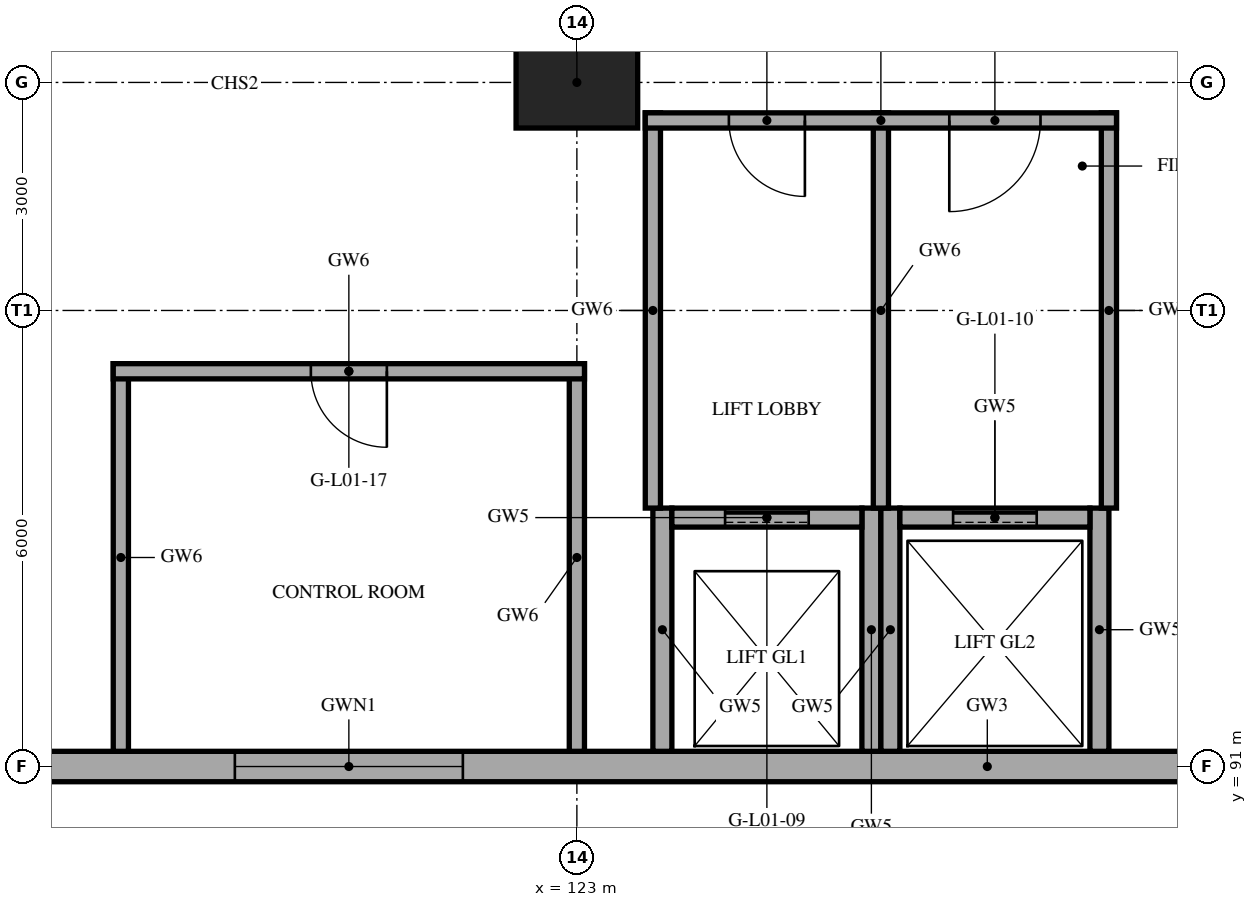
"""IFC4 building model, lengths in metres.
Left out: names, types, materials, properties, quantities, classifications, styles, units other than length and angle.
Written with IfcOpenShell. Run it as: python <this file> out.ifc"""

import sys

from ifc_helpers import new_model, si_unit, direction, frame, frame_2d, origin, origin_2d, place, context, subcontext, project, spatial, rectangle, extrude, element, fill, save


model = new_model("IFC4")
c1 = context("Model", 3, precision=1e-05, world=origin(), true_north=direction((0.0, 1.0)))
c2 = subcontext(c1, "Body", "Model", "MODEL_VIEW")
j1 = project(units=[si_unit("LENGTHUNIT", "METRE"), si_unit("PLANEANGLEUNIT", "RADIAN")], contexts=[c1])
p1 = place(None, origin())
s1 = spatial("IfcSite", under=j1, at=p1, CompositionType="ELEMENT")
p2 = place(p1, origin())
s2 = spatial("IfcBuilding", under=s1, at=p2, CompositionType="ELEMENT")
p3 = place(p2, frame((0.0, 0.0, 5.0)))
s3 = spatial("IfcBuildingStorey", under=s2, at=p3, CompositionType="ELEMENT", Elevation=5.0)
p4 = place(p3, frame((123.0, 100.0, 0.0), z_axis=(0.0, 0.0, 1.0), x_axis=(1.0, 0.0, 0.0)))
e1 = element("IfcColumn", 1, at=p4, inside=s3, PredefinedType="COLUMN", context=c2, shape_type="SweptSolid", body=[
    extrude(rectangle(XDim=1.6, YDim=1.2, at=origin_2d()), origin(), (0.0, 0.0, 1.0), 5.0),
])
p5 = place(p3, frame((107.6, 91.0, 0.0), z_axis=(0.0, 0.0, 1.0), x_axis=(1.0, 0.0, 0.0)))
e2 = element("IfcWall", 2, at=p5, inside=s3, PredefinedType="SHEAR", context=c2, shape_type="SweptSolid", body=[
    extrude(rectangle(XDim=41.6, YDim=0.4, at=frame_2d((20.8, 0.0))), origin(), (0.0, 0.0, 1.0), 5.0),
])
p6 = place(p5, frame((10.9, 0.0, 1.0)))
e3 = element("IfcOpeningElement", 3, at=p6, cuts=e2, PredefinedType="OPENING", context=c2, shape_type="SweptSolid", body=[
    extrude(rectangle(XDim=3.0, YDim=1.2, at=frame_2d((1.5, 0.6))), frame((0.0, 0.21, 0.0), z_axis=(0.0, -1.0, 0.0), x_axis=(1.0, 0.0, 0.0)), (0.0, 0.0, 1.0), 0.42),
])
p7 = place(p5, frame((2.5, 0.0, 0.0)))
e4 = element("IfcOpeningElement", 4, at=p7, cuts=e2, PredefinedType="OPENING", context=c2, shape_type="SweptSolid", body=[
    extrude(rectangle(XDim=1.8, YDim=2.1, at=frame_2d((0.9, 1.05))), frame((0.0, 0.21, 0.0), z_axis=(0.0, -1.0, 0.0), x_axis=(1.0, 0.0, 0.0)), (0.0, 0.0, 1.0), 0.42),
])
p8 = place(p5, frame((37.5, 0.0, 0.0)))
e5 = element("IfcOpeningElement", 5, at=p8, cuts=e2, PredefinedType="OPENING", context=c2, shape_type="SweptSolid", body=[
    extrude(rectangle(XDim=1.8, YDim=2.1, at=frame_2d((0.9, 1.05))), frame((0.0, 0.21, 0.0), z_axis=(0.0, -1.0, 0.0), x_axis=(1.0, 0.0, 0.0)), (0.0, 0.0, 1.0), 0.42),
])
for number, where, z_axis, x_axis in (
    (6, (124.125, 91.2, 0.0), (0.0, 0.0, 1.0), (0.0, 1.0, 0.0)),
    (7, (126.875, 91.2, 0.0), (0.0, 0.0, 1.0), (0.0, 1.0, 0.0)),
):
    element("IfcWall", number, at=place(p3, frame(where, z_axis=z_axis, x_axis=x_axis)), inside=s3, PredefinedType="SHEAR", context=c2, shape_type="SweptSolid", body=[
        extrude(rectangle(XDim=3.2, YDim=0.25, at=frame_2d((1.6, 0.0))), origin(), (0.0, 0.0, 1.0), 5.0),
    ])
p9 = place(p3, frame((124.25, 94.275, 0.0), z_axis=(0.0, 0.0, 1.0), x_axis=(1.0, 0.0, 0.0)))
e8 = element("IfcWall", 8, at=p9, inside=s3, PredefinedType="SHEAR", context=c2, shape_type="SweptSolid", body=[
    extrude(rectangle(XDim=2.5, YDim=0.25, at=frame_2d((1.25, 0.0))), origin(), (0.0, 0.0, 1.0), 5.0),
])
p10 = place(p9, frame((0.7, 0.0, 0.0)))
e9 = element("IfcOpeningElement", 9, at=p10, cuts=e8, PredefinedType="OPENING", context=c2, shape_type="SweptSolid", body=[
    extrude(rectangle(XDim=1.1, YDim=2.1, at=frame_2d((0.55, 1.05))), frame((0.0, 0.135, 0.0), z_axis=(0.0, -1.0, 0.0), x_axis=(1.0, 0.0, 0.0)), (0.0, 0.0, 1.0), 0.27),
])
for number, where, z_axis, x_axis in (
    (10, (127.125, 91.2, 0.0), (0.0, 0.0, 1.0), (0.0, 1.0, 0.0)),
    (11, (129.875, 91.2, 0.0), (0.0, 0.0, 1.0), (0.0, 1.0, 0.0)),
):
    element("IfcWall", number, at=place(p3, frame(where, z_axis=z_axis, x_axis=x_axis)), inside=s3, PredefinedType="SHEAR", context=c2, shape_type="SweptSolid", body=[
        extrude(rectangle(XDim=3.2, YDim=0.25, at=frame_2d((1.6, 0.0))), origin(), (0.0, 0.0, 1.0), 5.0),
    ])
p11 = place(p3, frame((127.25, 94.275, 0.0), z_axis=(0.0, 0.0, 1.0), x_axis=(1.0, 0.0, 0.0)))
e12 = element("IfcWall", 12, at=p11, inside=s3, PredefinedType="SHEAR", context=c2, shape_type="SweptSolid", body=[
    extrude(rectangle(XDim=2.5, YDim=0.25, at=frame_2d((1.25, 0.0))), origin(), (0.0, 0.0, 1.0), 5.0),
])
p12 = place(p11, frame((0.7, 0.0, 0.0)))
e13 = element("IfcOpeningElement", 13, at=p12, cuts=e12, PredefinedType="OPENING", context=c2, shape_type="SweptSolid", body=[
    extrude(rectangle(XDim=1.1, YDim=2.1, at=frame_2d((0.55, 1.05))), frame((0.0, 0.135, 0.0), z_axis=(0.0, -1.0, 0.0), x_axis=(1.0, 0.0, 0.0)), (0.0, 0.0, 1.0), 0.27),
])
for number, where, z_axis, x_axis in (
    (14, (124.0, 94.4, 0.0), (0.0, 0.0, 1.0), (0.0, 1.0, 0.0)),
    (15, (127.0, 94.4, 0.0), (0.0, 0.0, 1.0), (0.0, 1.0, 0.0)),
    (16, (130.0, 94.4, 0.0), (0.0, 0.0, 1.0), (0.0, 1.0, 0.0)),
):
    element("IfcWall", number, at=place(p3, frame(where, z_axis=z_axis, x_axis=x_axis)), inside=s3, PredefinedType="PARTITIONING", context=c2, shape_type="SweptSolid", body=[
        extrude(rectangle(XDim=5.2, YDim=0.2, at=frame_2d((2.6, 0.0))), origin(), (0.0, 0.0, 1.0), 4.7),
    ])
p13 = place(p3, frame((123.9, 99.5, 0.0), z_axis=(0.0, 0.0, 1.0), x_axis=(1.0, 0.0, 0.0)))
e17 = element("IfcWall", 17, at=p13, inside=s3, PredefinedType="PARTITIONING", context=c2, shape_type="SweptSolid", body=[
    extrude(rectangle(XDim=6.2, YDim=0.2, at=frame_2d((3.1, 0.0))), origin(), (0.0, 0.0, 1.0), 4.7),
])
p14 = place(p13, frame((1.1, 0.0, 0.0)))
e18 = element("IfcOpeningElement", 18, at=p14, cuts=e17, PredefinedType="OPENING", context=c2, shape_type="SweptSolid", body=[
    extrude(rectangle(XDim=1.0, YDim=2.1, at=frame_2d((0.5, 1.05))), frame((0.0, 0.11, 0.0), z_axis=(0.0, -1.0, 0.0), x_axis=(1.0, 0.0, 0.0)), (0.0, 0.0, 1.0), 0.22),
])
p15 = place(p13, frame((4.0, 0.0, 0.0)))
e19 = element("IfcOpeningElement", 19, at=p15, cuts=e17, PredefinedType="OPENING", context=c2, shape_type="SweptSolid", body=[
    extrude(rectangle(XDim=1.2, YDim=2.1, at=frame_2d((0.6, 1.05))), frame((0.0, 0.11, 0.0), z_axis=(0.0, -1.0, 0.0), x_axis=(1.0, 0.0, 0.0)), (0.0, 0.0, 1.0), 0.22),
])
for number, where, z_axis, x_axis in (
    (20, (117.0, 91.2, 0.0), (0.0, 0.0, 1.0), (0.0, 1.0, 0.0)),
    (21, (123.0, 91.2, 0.0), (0.0, 0.0, 1.0), (0.0, 1.0, 0.0)),
):
    element("IfcWall", number, at=place(p3, frame(where, z_axis=z_axis, x_axis=x_axis)), inside=s3, PredefinedType="PARTITIONING", context=c2, shape_type="SweptSolid", body=[
        extrude(rectangle(XDim=5.1, YDim=0.2, at=frame_2d((2.55, 0.0))), origin(), (0.0, 0.0, 1.0), 4.7),
    ])
p16 = place(p3, frame((116.9, 96.2, 0.0), z_axis=(0.0, 0.0, 1.0), x_axis=(1.0, 0.0, 0.0)))
e22 = element("IfcWall", 22, at=p16, inside=s3, PredefinedType="PARTITIONING", context=c2, shape_type="SweptSolid", body=[
    extrude(rectangle(XDim=6.2, YDim=0.2, at=frame_2d((3.1, 0.0))), origin(), (0.0, 0.0, 1.0), 4.7),
])
p17 = place(p16, frame((2.6, 0.0, 0.0)))
e23 = element("IfcOpeningElement", 23, at=p17, cuts=e22, PredefinedType="OPENING", context=c2, shape_type="SweptSolid", body=[
    extrude(rectangle(XDim=1.0, YDim=2.1, at=frame_2d((0.5, 1.05))), frame((0.0, 0.11, 0.0), z_axis=(0.0, -1.0, 0.0), x_axis=(1.0, 0.0, 0.0)), (0.0, 0.0, 1.0), 0.22),
])
p18 = place(p10, origin())
e24 = element("IfcDoor", 24, at=p18, inside=s3, OperationType="SLIDING_TO_LEFT", PredefinedType="DOOR", context=c2, shape_type="SweptSolid", body=[
    extrude(rectangle(XDim=1.1, YDim=2.1, at=frame_2d((0.55, 1.05))), frame((0.0, 0.025, 0.0), z_axis=(0.0, -1.0, 0.0), x_axis=(1.0, 0.0, 0.0)), (0.0, 0.0, 1.0), 0.05),
])
fill(e9, e24)
p19 = place(p12, origin())
e25 = element("IfcDoor", 25, at=p19, inside=s3, OperationType="SLIDING_TO_LEFT", PredefinedType="DOOR", context=c2, shape_type="SweptSolid", body=[
    extrude(rectangle(XDim=1.1, YDim=2.1, at=frame_2d((0.55, 1.05))), frame((0.0, 0.025, 0.0), z_axis=(0.0, -1.0, 0.0), x_axis=(1.0, 0.0, 0.0)), (0.0, 0.0, 1.0), 0.05),
])
fill(e13, e25)
p20 = place(p14, frame((1.0, 0.0, 0.0), z_axis=(0.0, 0.0, 1.0), x_axis=(-1.0, 0.0, 0.0)))
e26 = element("IfcDoor", 26, at=p20, inside=s3, OperationType="SINGLE_SWING_LEFT", PredefinedType="DOOR", context=c2, shape_type="SweptSolid", body=[
    extrude(rectangle(XDim=1.0, YDim=2.1, at=frame_2d((0.5, 1.05))), frame((0.0, 0.025, 0.0), z_axis=(0.0, -1.0, 0.0), x_axis=(1.0, 0.0, 0.0)), (0.0, 0.0, 1.0), 0.05),
])
fill(e18, e26)
p21 = place(p15, frame((1.2, 0.0, 0.0), z_axis=(0.0, 0.0, 1.0), x_axis=(-1.0, 0.0, 0.0)))
e27 = element("IfcDoor", 27, at=p21, inside=s3, OperationType="SINGLE_SWING_RIGHT", PredefinedType="DOOR", context=c2, shape_type="SweptSolid", body=[
    extrude(rectangle(XDim=1.2, YDim=2.1, at=frame_2d((0.6, 1.05))), frame((0.0, 0.025, 0.0), z_axis=(0.0, -1.0, 0.0), x_axis=(1.0, 0.0, 0.0)), (0.0, 0.0, 1.0), 0.05),
])
fill(e19, e27)
p22 = place(p17, frame((1.0, 0.0, 0.0), z_axis=(0.0, 0.0, 1.0), x_axis=(-1.0, 0.0, 0.0)))
e28 = element("IfcDoor", 28, at=p22, inside=s3, OperationType="SINGLE_SWING_LEFT", PredefinedType="DOOR", context=c2, shape_type="SweptSolid", body=[
    extrude(rectangle(XDim=1.0, YDim=2.1, at=frame_2d((0.5, 1.05))), frame((0.0, 0.025, 0.0), z_axis=(0.0, -1.0, 0.0), x_axis=(1.0, 0.0, 0.0)), (0.0, 0.0, 1.0), 0.05),
])
fill(e23, e28)
p23 = place(p6, origin())
e29 = element("IfcWindow", 29, at=p23, inside=s3, PartitioningType="SINGLE_PANEL", PredefinedType="WINDOW", context=c2, shape_type="SweptSolid", body=[
    extrude(rectangle(XDim=3.0, YDim=1.2, at=frame_2d((1.5, 0.6))), frame((0.0, 0.03, 0.0), z_axis=(0.0, -1.0, 0.0), x_axis=(1.0, 0.0, 0.0)), (0.0, 0.0, 1.0), 0.06),
])
fill(e3, e29)
save(model, sys.argv[1])
